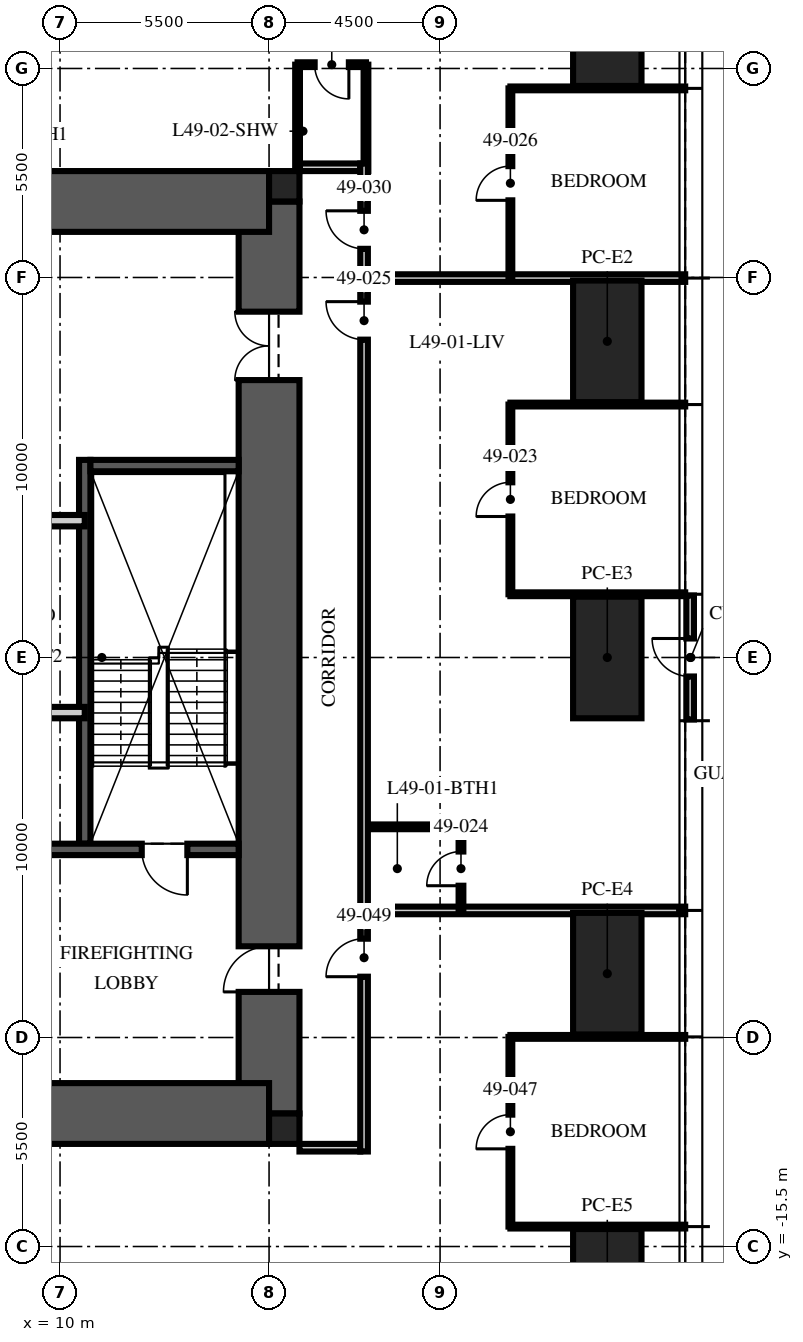
"""IFC4 building model, lengths in metres.
Left out: names, types, materials, properties, quantities, classifications, styles, units other than length and angle.
Written with IfcOpenShell. Run it as: python <this file> out.ifc"""

import sys

from ifc_helpers import new_model, si_unit, direction, frame, frame_2d, origin, origin_2d, place, context, subcontext, project, spatial, rectangle, hollow_rectangle, extrude, element, fill, save


model = new_model("IFC4")
c1 = context("Model", 3, precision=1e-05, world=origin(), true_north=direction((0.0, 1.0)))
c2 = subcontext(c1, "Body", "Model", "MODEL_VIEW")
j1 = project(units=[si_unit("LENGTHUNIT", "METRE"), si_unit("PLANEANGLEUNIT", "RADIAN")], contexts=[c1])
p1 = place(None, origin())
s1 = spatial("IfcSite", under=j1, at=p1, CompositionType="ELEMENT")
p2 = place(p1, origin())
s2 = spatial("IfcBuilding", under=s1, at=p2, CompositionType="ELEMENT")
p3 = place(p2, frame((0.0, 0.0, 199.5)))
s3 = spatial("IfcBuildingStorey", under=s2, at=p3, CompositionType="ELEMENT", Elevation=199.5)
p4 = place(p3, frame((15.5, -12.0, -0.25), z_axis=(0.0, 0.0, 1.0), x_axis=(0.0, 1.0, 0.0)))
e1 = element("IfcWall", 1, at=p4, inside=s3, PredefinedType="SHEAR", context=c2, shape_type="SweptSolid", body=[
    extrude(rectangle(XDim=24.0, YDim=1.6, at=frame_2d((12.0, 0.0))), origin(), (0.0, 0.0, 1.0), 3.75),
])
p5 = place(p4, frame((3.2, 0.0, 0.25)))
e2 = element("IfcOpeningElement", 2, at=p5, cuts=e1, PredefinedType="OPENING", context=c2, shape_type="SweptSolid", body=[
    extrude(rectangle(XDim=1.2, YDim=2.1, at=frame_2d((0.6, 1.05))), frame((0.0, 0.81, 0.0), z_axis=(0.0, -1.0, 0.0), x_axis=(1.0, 0.0, 0.0)), (0.0, 0.0, 1.0), 1.62),
])
p6 = place(p4, frame((19.3, 0.0, 0.25)))
e3 = element("IfcOpeningElement", 3, at=p6, cuts=e1, PredefinedType="OPENING", context=c2, shape_type="SweptSolid", body=[
    extrude(rectangle(XDim=1.8, YDim=2.1, at=frame_2d((0.9, 1.05))), frame((0.0, 0.81, 0.0), z_axis=(0.0, -1.0, 0.0), x_axis=(1.0, 0.0, 0.0)), (0.0, 0.0, 1.0), 1.62),
])
for number, where, z_axis, x_axis in (
    (4, (-15.5, 12.0, -0.25), (0.0, 0.0, 1.0), (1.0, 0.0, 0.0)),
    (5, (-15.5, -12.0, -0.25), (0.0, 0.0, 1.0), (1.0, 0.0, 0.0)),
):
    element("IfcWall", number, at=place(p3, frame(where, z_axis=z_axis, x_axis=x_axis)), inside=s3, PredefinedType="SHEAR", context=c2, shape_type="SweptSolid", body=[
        extrude(rectangle(XDim=31.0, YDim=1.6, at=frame_2d((15.5, 0.0))), origin(), (0.0, 0.0, 1.0), 3.75),
    ])
for number, where, z_axis, x_axis in (
    (6, (15.9, 12.4, -0.25), (0.0, 0.0, 1.0), (1.0, 0.0, 0.0)),
    (7, (15.9, -12.4, -0.25), (0.0, 0.0, 1.0), (1.0, 0.0, 0.0)),
):
    element("IfcColumn", number, at=place(p3, frame(where, z_axis=z_axis, x_axis=x_axis)), inside=s3, PredefinedType="COLUMN", context=c2, shape_type="SweptSolid", body=[
        extrude(rectangle(XDim=0.8, YDim=0.8, at=origin_2d()), origin(), (0.0, 0.0, 1.0), 3.75),
    ])
p7 = place(p3, frame((24.4, 16.64, 0.08), z_axis=(0.0, 0.0, 1.0), x_axis=(0.0, 1.0, 0.0)))
e8 = element("IfcColumn", 8, at=p7, inside=s3, PredefinedType="COLUMN", context=c2, shape_type="SweptSolid", body=[
    extrude(hollow_rectangle(XDim=3.2, YDim=1.8, WallThickness=0.2, at=origin_2d()), origin(), (0.0, 0.0, 1.0), 3.67),
])
p8 = place(p3, frame((24.4, 8.32, -0.07), z_axis=(0.0, 0.0, 1.0), x_axis=(0.0, 1.0, 0.0)))
e9 = element("IfcColumn", 9, at=p8, inside=s3, PredefinedType="COLUMN", context=c2, shape_type="SweptSolid", body=[
    extrude(hollow_rectangle(XDim=3.2, YDim=1.8, WallThickness=0.2, at=origin_2d()), origin(), (0.0, 0.0, 1.0), 3.82),
])
p9 = place(p3, frame((24.4, 0.0, -0.23), z_axis=(0.0, 0.0, 1.0), x_axis=(0.0, 1.0, 0.0)))
e10 = element("IfcColumn", 10, at=p9, inside=s3, PredefinedType="COLUMN", context=c2, shape_type="SweptSolid", body=[
    extrude(hollow_rectangle(XDim=3.2, YDim=1.8, WallThickness=0.2, at=origin_2d()), origin(), (0.0, 0.0, 1.0), 3.98),
])
p10 = place(p3, frame((24.4, -8.32, -0.07), z_axis=(0.0, 0.0, 1.0), x_axis=(0.0, 1.0, 0.0)))
e11 = element("IfcColumn", 11, at=p10, inside=s3, PredefinedType="COLUMN", context=c2, shape_type="SweptSolid", body=[
    extrude(hollow_rectangle(XDim=3.2, YDim=1.8, WallThickness=0.2, at=origin_2d()), origin(), (0.0, 0.0, 1.0), 3.82),
])
p11 = place(p3, frame((24.4, -16.64, 0.08), z_axis=(0.0, 0.0, 1.0), x_axis=(0.0, 1.0, 0.0)))
e12 = element("IfcColumn", 12, at=p11, inside=s3, PredefinedType="COLUMN", context=c2, shape_type="SweptSolid", body=[
    extrude(hollow_rectangle(XDim=3.2, YDim=1.8, WallThickness=0.2, at=origin_2d()), origin(), (0.0, 0.0, 1.0), 3.67),
])
p12 = place(p3, frame((26.58, -1.632, 0.0), z_axis=(0.0, 0.0, 1.0), x_axis=(0.0, 1.0, 0.0)))
e13 = element("IfcWall", 13, at=p12, inside=s3, PredefinedType="ELEMENTEDWALL", context=c2, shape_type="SweptSolid", body=[
    extrude(rectangle(XDim=3.263, YDim=0.2, at=frame_2d((1.632, 0.0))), origin(), (0.0, 0.0, 1.0), 3.75),
])
p13 = place(p12, frame((1.132, 0.0, 0.0)))
e14 = element("IfcOpeningElement", 14, at=p13, cuts=e13, PredefinedType="OPENING", context=c2, shape_type="SweptSolid", body=[
    extrude(rectangle(XDim=1.0, YDim=2.4, at=frame_2d((0.5, 1.2))), frame((0.0, 0.11, 0.0), z_axis=(0.0, -1.0, 0.0), x_axis=(1.0, 0.0, 0.0)), (0.0, 0.0, 1.0), 0.22),
])
p14 = place(p3, frame((10.65, -4.9, 0.0), z_axis=(0.0, 0.0, 1.0), x_axis=(0.0, 1.0, 0.0)))
e15 = element("IfcWall", 15, at=p14, inside=s3, PredefinedType="SOLIDWALL", context=c2, shape_type="SweptSolid", body=[
    extrude(rectangle(XDim=10.1, YDim=0.3, at=frame_2d((5.05, 0.0))), origin(), (0.0, 0.0, 1.0), 3.5),
])
p15 = place(p3, frame((14.7, -5.05, 0.0), z_axis=(0.0, 0.0, 1.0), x_axis=(-1.0, 0.0, 0.0)))
e16 = element("IfcWall", 16, at=p15, inside=s3, PredefinedType="SOLIDWALL", context=c2, shape_type="SweptSolid", body=[
    extrude(rectangle(XDim=5.9, YDim=0.3, at=frame_2d((2.95, 0.0))), origin(), (0.0, 0.0, 1.0), 3.5),
])
p16 = place(p15, frame((1.35, 0.0, 0.0)))
e17 = element("IfcOpeningElement", 17, at=p16, cuts=e16, PredefinedType="OPENING", context=c2, shape_type="SweptSolid", body=[
    extrude(rectangle(XDim=1.2, YDim=2.1, at=frame_2d((0.6, 1.05))), frame((0.0, 0.16, 0.0), z_axis=(0.0, -1.0, 0.0), x_axis=(1.0, 0.0, 0.0)), (0.0, 0.0, 1.0), 0.32),
])
p17 = place(p3, frame((14.7, 5.05, 0.0), z_axis=(0.0, 0.0, 1.0), x_axis=(-1.0, 0.0, 0.0)))
e18 = element("IfcWall", 18, at=p17, inside=s3, PredefinedType="SOLIDWALL", context=c2, shape_type="SweptSolid", body=[
    extrude(rectangle(XDim=3.9, YDim=0.3, at=frame_2d((1.95, 0.0))), origin(), (0.0, 0.0, 1.0), 3.5),
])
p18 = place(p3, frame((-10.65, 3.6, 0.0), z_axis=(0.0, 0.0, 1.0), x_axis=(1.0, 0.0, 0.0)))
e19 = element("IfcWall", 19, at=p18, inside=s3, PredefinedType="PARTITIONING", context=c2, shape_type="SweptSolid", body=[
    extrude(rectangle(XDim=21.3, YDim=0.3, at=frame_2d((10.65, 0.0))), origin(), (0.0, 0.0, 1.0), 3.5),
])
p19 = place(p18, frame((10.05, 0.0, 0.0)))
e20 = element("IfcOpeningElement", 20, at=p19, cuts=e19, PredefinedType="OPENING", context=c2, shape_type="SweptSolid", body=[
    extrude(rectangle(XDim=1.2, YDim=2.1, at=frame_2d((0.6, 1.05))), frame((0.0, 0.16, 0.0), z_axis=(0.0, -1.0, 0.0), x_axis=(1.0, 0.0, 0.0)), (0.0, 0.0, 1.0), 0.32),
])
p20 = place(p18, frame((19.238, 0.0, 0.0)))
e21 = element("IfcOpeningElement", 21, at=p20, cuts=e19, PredefinedType="OPENING", context=c2, shape_type="SweptSolid", body=[
    extrude(rectangle(XDim=0.9, YDim=2.1, at=frame_2d((0.45, 1.05))), frame((0.0, 0.16, 0.0), z_axis=(0.0, -1.0, 0.0), x_axis=(1.0, 0.0, 0.0)), (0.0, 0.0, 1.0), 0.32),
])
p21 = place(p3, frame((10.65, -1.45, 0.0), z_axis=(0.0, 0.0, 1.0), x_axis=(-1.0, 0.0, 0.0)))
e22 = element("IfcWall", 22, at=p21, inside=s3, PredefinedType="PARTITIONING", context=c2, shape_type="SweptSolid", body=[
    extrude(rectangle(XDim=6.45, YDim=0.3, at=frame_2d((3.225, 0.0))), origin(), (0.0, 0.0, 1.0), 3.5),
])
for number, where, z_axis, x_axis in (
    (23, (16.3, 12.9, 0.0), (0.0, 0.0, 1.0), (1.0, 0.0, 0.0)),
    (24, (16.3, -12.9, 0.0), (0.0, 0.0, 1.0), (1.0, 0.0, 0.0)),
):
    element("IfcWall", number, at=place(p3, frame(where, z_axis=z_axis, x_axis=x_axis)), inside=s3, PredefinedType="PARTITIONING", context=c2, shape_type="SweptSolid", body=[
        extrude(rectangle(XDim=1.6, YDim=0.2, at=frame_2d((0.8, 0.0))), origin(), (0.0, 0.0, 1.0), 2.3),
    ])
p22 = place(p3, frame((18.1, -6.656, 0.0), z_axis=(0.0, 0.0, 1.0), x_axis=(1.0, 0.0, 0.0)))
e25 = element("IfcWall", 25, at=p22, inside=s3, PredefinedType="PARTITIONING", context=c2, shape_type="SweptSolid", body=[
    extrude(rectangle(XDim=8.35, YDim=0.2, at=frame_2d((4.175, 0.0))), origin(), (0.0, 0.0, 1.0), 2.91),
])
for number, where, z_axis, x_axis in (
    (26, (21.85, 1.664, 0.0), (0.0, 0.0, 1.0), (1.0, 0.0, 0.0)),
    (27, (21.85, 6.656, 0.0), (0.0, 0.0, 1.0), (1.0, 0.0, 0.0)),
):
    element("IfcWall", number, at=place(p3, frame(where, z_axis=z_axis, x_axis=x_axis)), inside=s3, PredefinedType="PARTITIONING", context=c2, shape_type="SweptSolid", body=[
        extrude(rectangle(XDim=4.6, YDim=0.1, at=frame_2d((2.3, 0.0))), origin(), (0.0, 0.0, 1.0), 2.91),
    ])
p23 = place(p3, frame((18.1, 9.984, 0.0), z_axis=(0.0, 0.0, 1.0), x_axis=(1.0, 0.0, 0.0)))
e28 = element("IfcWall", 28, at=p23, inside=s3, PredefinedType="PARTITIONING", context=c2, shape_type="SweptSolid", body=[
    extrude(rectangle(XDim=8.35, YDim=0.2, at=frame_2d((4.175, 0.0))), origin(), (0.0, 0.0, 1.0), 2.91),
])
for number, where, z_axis, x_axis in (
    (29, (21.85, 14.976, 0.0), (0.0, 0.0, 1.0), (1.0, 0.0, 0.0)),
    (30, (21.85, -14.976, 0.0), (0.0, 0.0, 1.0), (1.0, 0.0, 0.0)),
    (31, (21.85, -9.984, 0.0), (0.0, 0.0, 1.0), (1.0, 0.0, 0.0)),
):
    element("IfcWall", number, at=place(p3, frame(where, z_axis=z_axis, x_axis=x_axis)), inside=s3, PredefinedType="PARTITIONING", context=c2, shape_type="SweptSolid", body=[
        extrude(rectangle(XDim=4.6, YDim=0.1, at=frame_2d((2.3, 0.0))), origin(), (0.0, 0.0, 1.0), 2.91),
    ])
p24 = place(p3, frame((21.85, 1.664, 0.0), z_axis=(0.0, 0.0, 1.0), x_axis=(0.0, 1.0, 0.0)))
e32 = element("IfcWall", 32, at=p24, inside=s3, PredefinedType="PARTITIONING", context=c2, shape_type="SweptSolid", body=[
    extrude(rectangle(XDim=4.992, YDim=0.1, at=frame_2d((2.496, 0.0))), origin(), (0.0, 0.0, 1.0), 2.81),
])
p25 = place(p24, frame((2.046, 0.0, 0.0)))
e33 = element("IfcOpeningElement", 33, at=p25, cuts=e32, PredefinedType="OPENING", context=c2, shape_type="SweptSolid", body=[
    extrude(rectangle(XDim=0.9, YDim=2.1, at=frame_2d((0.45, 1.05))), frame((0.0, 0.06, 0.0), z_axis=(0.0, -1.0, 0.0), x_axis=(1.0, 0.0, 0.0)), (0.0, 0.0, 1.0), 0.12),
])
p26 = place(p3, frame((20.55, -6.656, 0.0), z_axis=(0.0, 0.0, 1.0), x_axis=(0.0, 1.0, 0.0)))
e34 = element("IfcWall", 34, at=p26, inside=s3, PredefinedType="PARTITIONING", context=c2, shape_type="SweptSolid", body=[
    extrude(rectangle(XDim=2.2, YDim=0.125, at=frame_2d((1.1, 0.0))), origin(), (0.0, 0.0, 1.0), 3.5),
])
p27 = place(p26, frame((0.65, 0.0, 0.0)))
e35 = element("IfcOpeningElement", 35, at=p27, cuts=e34, PredefinedType="OPENING", context=c2, shape_type="SweptSolid", body=[
    extrude(rectangle(XDim=0.9, YDim=2.1, at=frame_2d((0.45, 1.05))), frame((0.0, 0.073, 0.0), z_axis=(0.0, -1.0, 0.0), x_axis=(1.0, 0.0, 0.0)), (0.0, 0.0, 1.0), 0.145),
])
p28 = place(p3, frame((18.1, -4.456, 0.0), z_axis=(0.0, 0.0, 1.0), x_axis=(1.0, 0.0, 0.0)))
e36 = element("IfcWall", 36, at=p28, inside=s3, PredefinedType="PARTITIONING", context=c2, shape_type="SweptSolid", body=[
    extrude(rectangle(XDim=2.45, YDim=0.125, at=frame_2d((1.225, 0.0))), origin(), (0.0, 0.0, 1.0), 3.5),
])
p29 = place(p3, frame((21.85, 9.984, 0.0), z_axis=(0.0, 0.0, 1.0), x_axis=(0.0, 1.0, 0.0)))
e37 = element("IfcWall", 37, at=p29, inside=s3, PredefinedType="PARTITIONING", context=c2, shape_type="SweptSolid", body=[
    extrude(rectangle(XDim=4.992, YDim=0.1, at=frame_2d((2.496, 0.0))), origin(), (0.0, 0.0, 1.0), 2.81),
])
p30 = place(p29, frame((2.046, 0.0, 0.0)))
e38 = element("IfcOpeningElement", 38, at=p30, cuts=e37, PredefinedType="OPENING", context=c2, shape_type="SweptSolid", body=[
    extrude(rectangle(XDim=0.9, YDim=2.1, at=frame_2d((0.45, 1.05))), frame((0.0, 0.06, 0.0), z_axis=(0.0, -1.0, 0.0), x_axis=(1.0, 0.0, 0.0)), (0.0, 0.0, 1.0), 0.12),
])
p31 = place(p3, frame((18.05, 15.6, 0.0), z_axis=(0.0, 0.0, 1.0), x_axis=(-1.0, 0.0, 0.0)))
e39 = element("IfcWall", 39, at=p31, inside=s3, PredefinedType="PARTITIONING", context=c2, shape_type="SweptSolid", body=[
    extrude(rectangle(XDim=1.8, YDim=0.125, at=frame_2d((0.9, 0.0))), origin(), (0.0, 0.0, 1.0), 2.3),
])
p32 = place(p31, frame((0.45, 0.0, 0.0)))
e40 = element("IfcOpeningElement", 40, at=p32, cuts=e39, PredefinedType="OPENING", context=c2, shape_type="SweptSolid", body=[
    extrude(rectangle(XDim=0.9, YDim=2.1, at=frame_2d((0.45, 1.05))), frame((0.0, 0.073, 0.0), z_axis=(0.0, -1.0, 0.0), x_axis=(1.0, 0.0, 0.0)), (0.0, 0.0, 1.0), 0.145),
])
for number, where, z_axis, x_axis in (
    (41, (18.05, 12.8, 0.0), (0.0, 0.0, 1.0), (0.0, 1.0, 0.0)),
    (42, (16.25, 12.8, 0.0), (0.0, 0.0, 1.0), (0.0, 1.0, 0.0)),
):
    element("IfcWall", number, at=place(p3, frame(where, z_axis=z_axis, x_axis=x_axis)), inside=s3, PredefinedType="PARTITIONING", context=c2, shape_type="SweptSolid", body=[
        extrude(rectangle(XDim=2.8, YDim=0.125, at=frame_2d((1.4, 0.0))), origin(), (0.0, 0.0, 1.0), 2.3),
    ])
p33 = place(p3, frame((21.85, -14.976, 0.0), z_axis=(0.0, 0.0, 1.0), x_axis=(0.0, 1.0, 0.0)))
e43 = element("IfcWall", 43, at=p33, inside=s3, PredefinedType="PARTITIONING", context=c2, shape_type="SweptSolid", body=[
    extrude(rectangle(XDim=4.992, YDim=0.1, at=frame_2d((2.496, 0.0))), origin(), (0.0, 0.0, 1.0), 2.81),
])
p34 = place(p33, frame((2.046, 0.0, 0.0)))
e44 = element("IfcOpeningElement", 44, at=p34, cuts=e43, PredefinedType="OPENING", context=c2, shape_type="SweptSolid", body=[
    extrude(rectangle(XDim=0.9, YDim=2.1, at=frame_2d((0.45, 1.05))), frame((0.0, 0.06, 0.0), z_axis=(0.0, -1.0, 0.0), x_axis=(1.0, 0.0, 0.0)), (0.0, 0.0, 1.0), 0.12),
])
p35 = place(p3, frame((18.0, -13.0, 0.0), z_axis=(0.0, 0.0, 1.0), x_axis=(0.0, 1.0, 0.0)))
e45 = element("IfcWall", 45, at=p35, inside=s3, PredefinedType="PARTITIONING", context=c2, shape_type="SweptSolid", body=[
    extrude(rectangle(XDim=26.0, YDim=0.2, at=frame_2d((13.0, 0.0))), origin(), (0.0, 0.0, 1.0), 2.6),
])
p36 = place(p35, frame((21.364, 0.0, 0.0)))
e46 = element("IfcOpeningElement", 46, at=p36, cuts=e45, PredefinedType="OPENING", context=c2, shape_type="SweptSolid", body=[
    extrude(rectangle(XDim=1.0, YDim=2.2, at=frame_2d((0.5, 1.1))), frame((0.0, 0.11, 0.0), z_axis=(0.0, -1.0, 0.0), x_axis=(1.0, 0.0, 0.0)), (0.0, 0.0, 1.0), 0.22),
])
p37 = place(p35, frame((23.754, 0.0, 0.0)))
e47 = element("IfcOpeningElement", 47, at=p37, cuts=e45, PredefinedType="OPENING", context=c2, shape_type="SweptSolid", body=[
    extrude(rectangle(XDim=1.0, YDim=2.2, at=frame_2d((0.5, 1.1))), frame((0.0, 0.11, 0.0), z_axis=(0.0, -1.0, 0.0), x_axis=(1.0, 0.0, 0.0)), (0.0, 0.0, 1.0), 0.22),
])
p38 = place(p35, frame((4.6, 0.0, 0.0)))
e48 = element("IfcOpeningElement", 48, at=p38, cuts=e45, PredefinedType="OPENING", context=c2, shape_type="SweptSolid", body=[
    extrude(rectangle(XDim=1.0, YDim=2.2, at=frame_2d((0.5, 1.1))), frame((0.0, 0.11, 0.0), z_axis=(0.0, -1.0, 0.0), x_axis=(1.0, 0.0, 0.0)), (0.0, 0.0, 1.0), 0.22),
])
p39 = place(p13, origin())
e49 = element("IfcDoor", 49, at=p39, inside=s3, OperationType="SINGLE_SWING_LEFT", PredefinedType="DOOR", context=c2, shape_type="SweptSolid", body=[
    extrude(rectangle(XDim=1.0, YDim=2.4, at=frame_2d((0.5, 1.2))), frame((0.0, 0.025, 0.0), z_axis=(0.0, -1.0, 0.0), x_axis=(1.0, 0.0, 0.0)), (0.0, 0.0, 1.0), 0.05),
])
fill(e14, e49)
p40 = place(p16, origin())
e50 = element("IfcDoor", 50, at=p40, inside=s3, OperationType="SINGLE_SWING_LEFT", PredefinedType="DOOR", context=c2, shape_type="SweptSolid", body=[
    extrude(rectangle(XDim=1.2, YDim=2.1, at=frame_2d((0.6, 1.05))), frame((0.0, 0.025, 0.0), z_axis=(0.0, -1.0, 0.0), x_axis=(1.0, 0.0, 0.0)), (0.0, 0.0, 1.0), 0.05),
])
fill(e17, e50)
p41 = place(p5, origin())
e51 = element("IfcDoor", 51, at=p41, inside=s3, OperationType="SINGLE_SWING_LEFT", PredefinedType="DOOR", context=c2, shape_type="SweptSolid", body=[
    extrude(rectangle(XDim=1.2, YDim=2.1, at=frame_2d((0.6, 1.05))), frame((0.0, 0.025, 0.0), z_axis=(0.0, -1.0, 0.0), x_axis=(1.0, 0.0, 0.0)), (0.0, 0.0, 1.0), 0.05),
])
fill(e2, e51)
p42 = place(p6, origin())
e52 = element("IfcDoor", 52, at=p42, inside=s3, OperationType="DOUBLE_DOOR_SINGLE_SWING", PredefinedType="DOOR", context=c2, shape_type="SweptSolid", body=[
    extrude(rectangle(XDim=1.8, YDim=2.1, at=frame_2d((0.9, 1.05))), frame((0.0, 0.025, 0.0), z_axis=(0.0, -1.0, 0.0), x_axis=(1.0, 0.0, 0.0)), (0.0, 0.0, 1.0), 0.05),
])
fill(e3, e52)
p43 = place(p25, origin())
e53 = element("IfcDoor", 53, at=p43, inside=s3, OperationType="SINGLE_SWING_LEFT", PredefinedType="DOOR", context=c2, shape_type="SweptSolid", body=[
    extrude(rectangle(XDim=0.9, YDim=2.1, at=frame_2d((0.45, 1.05))), frame((0.0, 0.025, 0.0), z_axis=(0.0, -1.0, 0.0), x_axis=(1.0, 0.0, 0.0)), (0.0, 0.0, 1.0), 0.05),
])
fill(e33, e53)
p44 = place(p27, origin())
e54 = element("IfcDoor", 54, at=p44, inside=s3, OperationType="SINGLE_SWING_LEFT", PredefinedType="DOOR", context=c2, shape_type="SweptSolid", body=[
    extrude(rectangle(XDim=0.9, YDim=2.1, at=frame_2d((0.45, 1.05))), frame((0.0, 0.025, 0.0), z_axis=(0.0, -1.0, 0.0), x_axis=(1.0, 0.0, 0.0)), (0.0, 0.0, 1.0), 0.05),
])
fill(e35, e54)
p45 = place(p36, origin())
e55 = element("IfcDoor", 55, at=p45, inside=s3, OperationType="SINGLE_SWING_RIGHT", PredefinedType="DOOR", context=c2, shape_type="SweptSolid", body=[
    extrude(rectangle(XDim=1.0, YDim=2.2, at=frame_2d((0.5, 1.1))), frame((0.0, 0.025, 0.0), z_axis=(0.0, -1.0, 0.0), x_axis=(1.0, 0.0, 0.0)), (0.0, 0.0, 1.0), 0.05),
])
fill(e46, e55)
p46 = place(p30, origin())
e56 = element("IfcDoor", 56, at=p46, inside=s3, OperationType="SINGLE_SWING_LEFT", PredefinedType="DOOR", context=c2, shape_type="SweptSolid", body=[
    extrude(rectangle(XDim=0.9, YDim=2.1, at=frame_2d((0.45, 1.05))), frame((0.0, 0.025, 0.0), z_axis=(0.0, -1.0, 0.0), x_axis=(1.0, 0.0, 0.0)), (0.0, 0.0, 1.0), 0.05),
])
fill(e38, e56)
p47 = place(p32, origin())
e57 = element("IfcDoor", 57, at=p47, inside=s3, OperationType="SINGLE_SWING_LEFT", PredefinedType="DOOR", context=c2, shape_type="SweptSolid", body=[
    extrude(rectangle(XDim=0.9, YDim=2.1, at=frame_2d((0.45, 1.05))), frame((0.0, 0.025, 0.0), z_axis=(0.0, -1.0, 0.0), x_axis=(1.0, 0.0, 0.0)), (0.0, 0.0, 1.0), 0.05),
])
fill(e40, e57)
p48 = place(p37, origin())
e58 = element("IfcDoor", 58, at=p48, inside=s3, OperationType="SINGLE_SWING_RIGHT", PredefinedType="DOOR", context=c2, shape_type="SweptSolid", body=[
    extrude(rectangle(XDim=1.0, YDim=2.2, at=frame_2d((0.5, 1.1))), frame((0.0, 0.025, 0.0), z_axis=(0.0, -1.0, 0.0), x_axis=(1.0, 0.0, 0.0)), (0.0, 0.0, 1.0), 0.05),
])
fill(e47, e58)
p49 = place(p34, origin())
e59 = element("IfcDoor", 59, at=p49, inside=s3, OperationType="SINGLE_SWING_LEFT", PredefinedType="DOOR", context=c2, shape_type="SweptSolid", body=[
    extrude(rectangle(XDim=0.9, YDim=2.1, at=frame_2d((0.45, 1.05))), frame((0.0, 0.025, 0.0), z_axis=(0.0, -1.0, 0.0), x_axis=(1.0, 0.0, 0.0)), (0.0, 0.0, 1.0), 0.05),
])
fill(e44, e59)
p50 = place(p38, origin())
e60 = element("IfcDoor", 60, at=p50, inside=s3, OperationType="SINGLE_SWING_LEFT", PredefinedType="DOOR", context=c2, shape_type="SweptSolid", body=[
    extrude(rectangle(XDim=1.0, YDim=2.2, at=frame_2d((0.5, 1.1))), frame((0.0, 0.025, 0.0), z_axis=(0.0, -1.0, 0.0), x_axis=(1.0, 0.0, 0.0)), (0.0, 0.0, 1.0), 0.05),
])
fill(e48, e60)
save(model, sys.argv[1])
